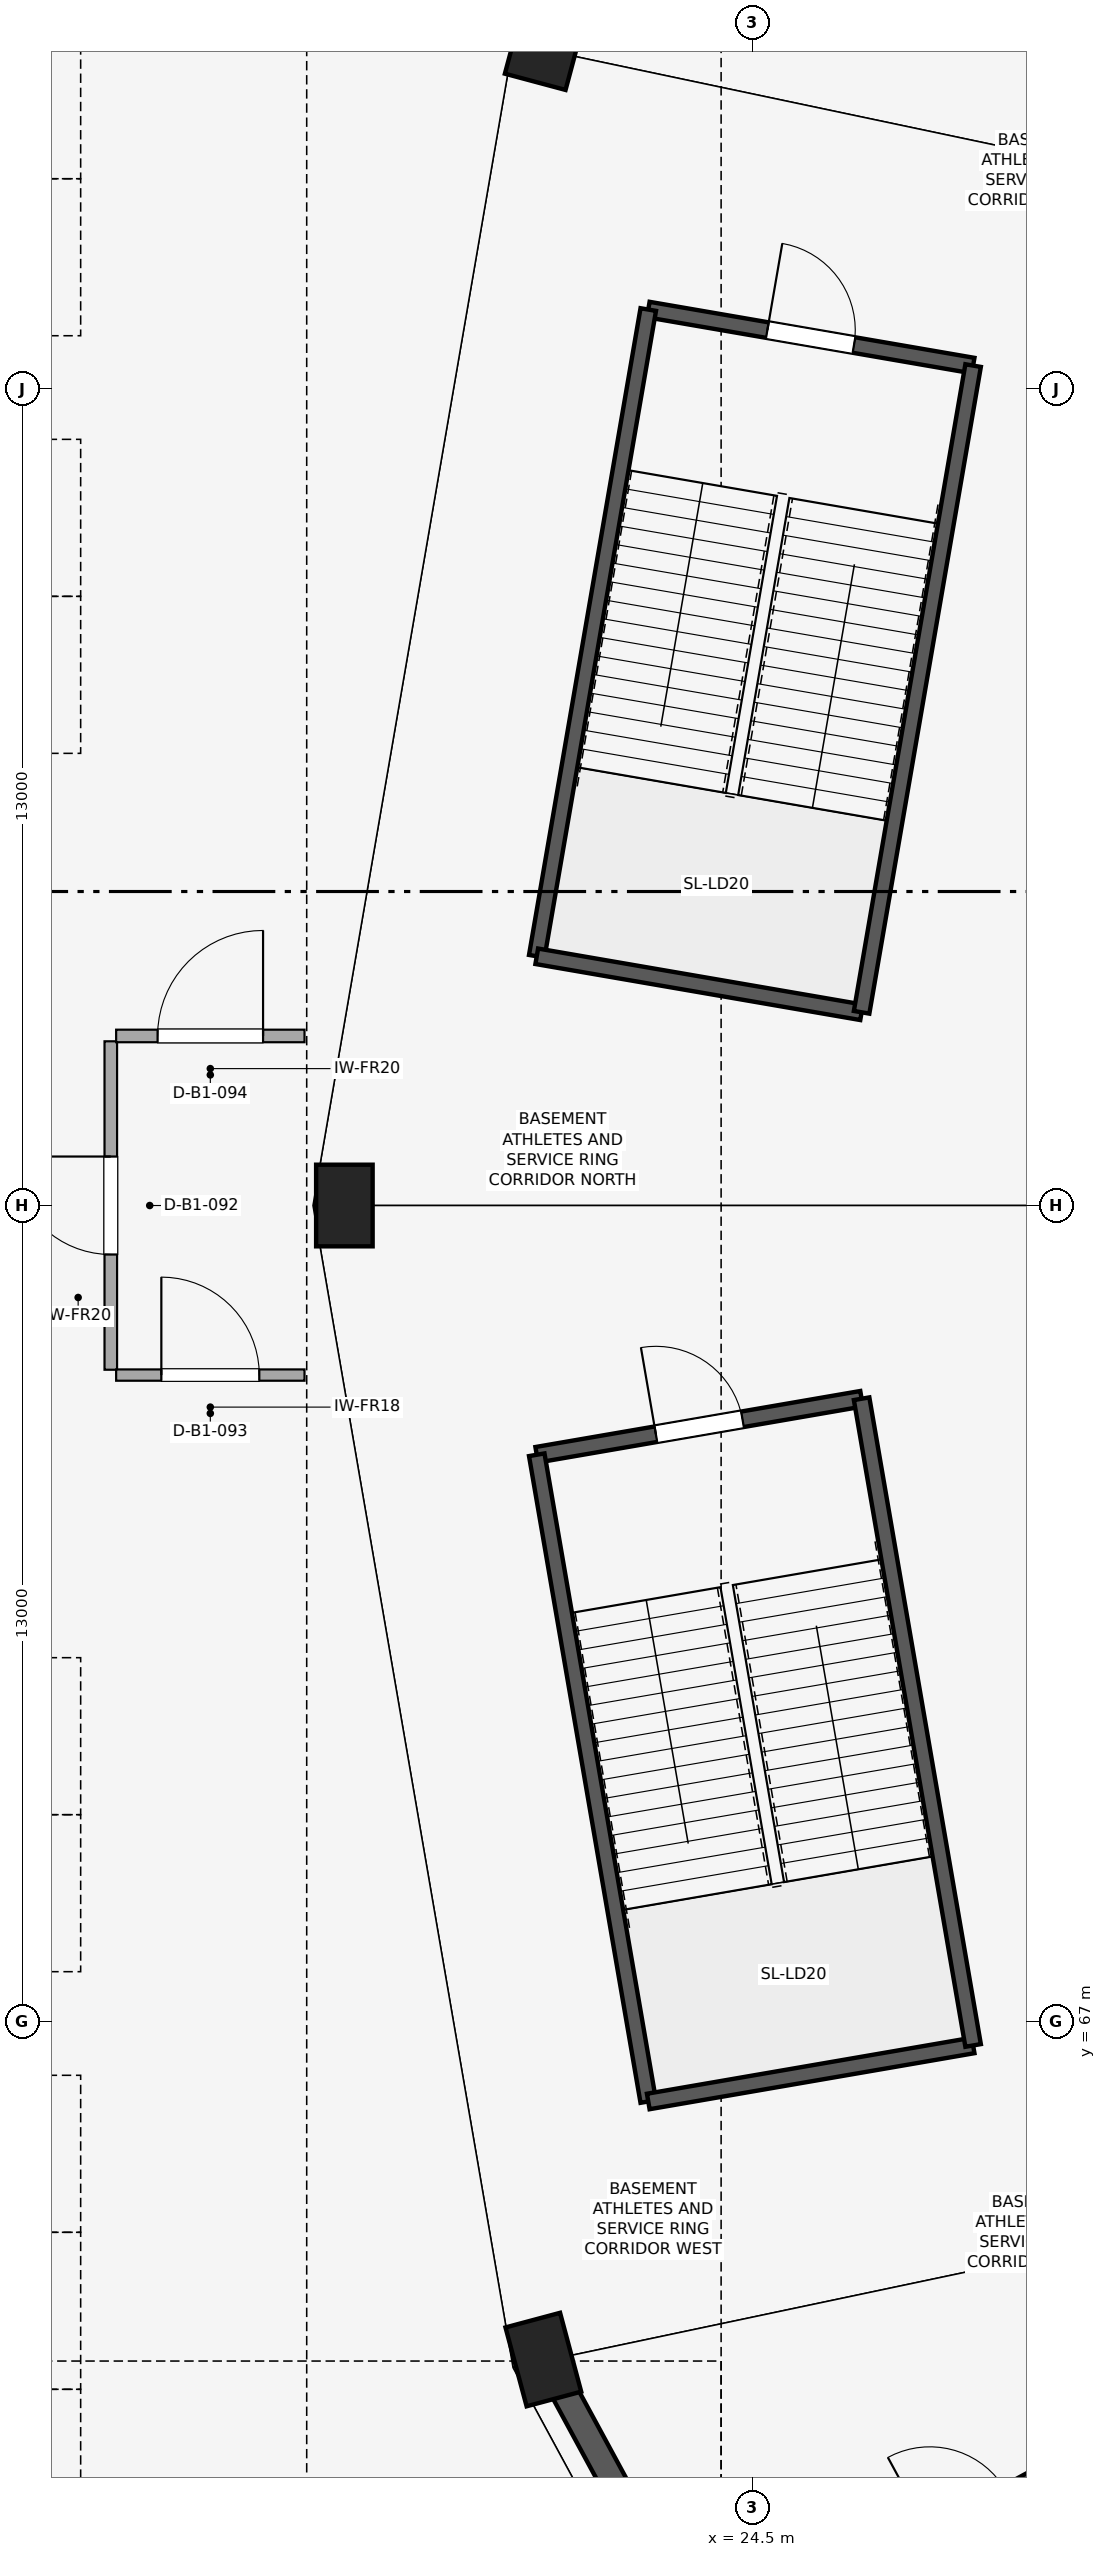
"""IFC4 building model, lengths in metres.
Left out: names, types, materials, properties, quantities, classifications, styles, units other than length and angle.
Written with IfcOpenShell. Run it as: python <this file> out.ifc"""

import sys

from ifc_helpers import new_model, si_unit, direction, frame, frame_2d, origin, origin_2d, place, context, subcontext, project, spatial, rectangle, extrude, element, fill, save


model = new_model("IFC4")
c1 = context("Model", 3, precision=1e-05, world=origin(), true_north=direction((0.0, 1.0)))
c2 = subcontext(c1, "Body", "Model", "MODEL_VIEW")
j1 = project(units=[si_unit("LENGTHUNIT", "METRE"), si_unit("PLANEANGLEUNIT", "RADIAN")], contexts=[c1])
p1 = place(None, origin())
s1 = spatial("IfcSite", under=j1, at=p1, CompositionType="ELEMENT")
p2 = place(p1, origin())
s2 = spatial("IfcBuilding", under=s1, at=p2, CompositionType="ELEMENT")
p3 = place(p2, frame((0.0, 0.0, -5.4)))
s3 = spatial("IfcBuildingStorey", under=s2, at=p3, CompositionType="ELEMENT", Elevation=-5.4)
p4 = place(p3, frame((21.169, 98.376, 0.0), z_axis=(0.0, 0.0, 1.0), x_axis=(-0.965925826289, 0.258819045103, 0.0)))
e1 = element("IfcColumn", 1, at=p4, inside=s3, PredefinedType="COLUMN", context=c2, shape_type="SweptSolid", body=[
    extrude(rectangle(XDim=1.0, YDim=1.0, at=origin_2d()), origin(), (0.0, 0.0, 1.0), 5.4),
])
for number, where, z_axis, x_axis in (
    (2, (18.0, 80.0, 0.0), (0.0, 0.0, 1.0), (-1.0, 0.0, 0.0)),
    (3, (21.169, 61.624, 0.0), (0.0, 0.0, 1.0), (-0.966, -0.259, 0.0)),
):
    element("IfcColumn", number, at=place(p3, frame(where, z_axis=z_axis, x_axis=x_axis)), inside=s3, PredefinedType="COLUMN", context=c2, shape_type="SweptSolid", body=[
        extrude(rectangle(XDim=0.9, YDim=1.3, at=origin_2d()), origin(), (0.0, 0.0, 1.0), 5.4),
    ])
for number, where, z_axis, x_axis in (
    (4, (30.503, 115.475, 0.0), (0.0, 0.0, 1.0), (-0.477, -0.879, 0.0)),
    (5, (21.217, 61.637, 0.0), (0.0, 0.0, 1.0), (0.477, -0.879, 0.0)),
):
    element("IfcWall", number, at=place(p3, frame(where, z_axis=z_axis, x_axis=x_axis)), inside=s3, PredefinedType="SOLIDWALL", context=c2, shape_type="SweptSolid", body=[
        extrude(rectangle(XDim=19.469, YDim=0.42, at=frame_2d((9.734, 0.0))), origin(), (0.0, 0.0, 1.0), 4.45),
    ])
p5 = place(p3, frame((26.238, 76.923, 0.0), z_axis=(0.0, 0.0, 1.0), x_axis=(-0.985457162135, -0.16992404655, 0.0)))
e6 = element("IfcWall", 6, at=p5, inside=s3, PredefinedType="SHEAR", context=c2, shape_type="SweptSolid", body=[
    extrude(rectangle(XDim=5.25, YDim=0.25, at=frame_2d((2.625, 0.0))), origin(), (0.0, 0.0, 1.0), 5.05),
])
p6 = place(p5, frame((1.925, 0.0, 0.0)))
e7 = element("IfcOpeningElement", 7, at=p6, cuts=e6, PredefinedType="OPENING", context=c2, shape_type="SweptSolid", body=[
    extrude(rectangle(XDim=1.4, YDim=2.2, at=frame_2d((0.7, 1.1))), frame((0.0, 0.135, 0.0), z_axis=(0.0, -1.0, 0.0), x_axis=(1.0, 0.0, 0.0)), (0.0, 0.0, 1.0), 0.27),
])
p7 = place(p3, frame((21.064, 76.031, 0.0), z_axis=(0.0, 0.0, 1.0), x_axis=(0.169938992676, -0.985454584833, 0.0)))
e8 = element("IfcWall", 8, at=p7, inside=s3, PredefinedType="SHEAR", context=c2, shape_type="SweptSolid", body=[
    extrude(rectangle(XDim=10.45, YDim=0.25, at=frame_2d((5.225, 0.0))), origin(), (0.0, 0.0, 1.0), 5.05),
])
p8 = place(p3, frame((22.84, 65.733, 0.0), z_axis=(0.0, 0.0, 1.0), x_axis=(0.985457162135, 0.16992404655, 0.0)))
e9 = element("IfcWall", 9, at=p8, inside=s3, PredefinedType="SHEAR", context=c2, shape_type="SweptSolid", body=[
    extrude(rectangle(XDim=5.25, YDim=0.25, at=frame_2d((2.625, 0.0))), origin(), (0.0, 0.0, 1.0), 5.05),
])
p9 = place(p3, frame((28.013, 66.625, 0.0), z_axis=(0.0, 0.0, 1.0), x_axis=(-0.169938992676, 0.985454584833, 0.0)))
e10 = element("IfcWall", 10, at=p9, inside=s3, PredefinedType="SHEAR", context=c2, shape_type="SweptSolid", body=[
    extrude(rectangle(XDim=10.45, YDim=0.25, at=frame_2d((5.225, 0.0))), origin(), (0.0, 0.0, 1.0), 5.05),
])
p10 = place(p3, frame((30.246, 60.42, 0.0), z_axis=(0.0, 0.0, 1.0), x_axis=(-0.878961487093, -0.47689275965, 0.0)))
e11 = element("IfcWall", 11, at=p10, inside=s3, PredefinedType="SHEAR", context=c2, shape_type="SweptSolid", body=[
    extrude(rectangle(XDim=5.25, YDim=0.25, at=frame_2d((2.625, 0.0))), origin(), (0.0, 0.0, 1.0), 5.05),
])
p11 = place(p10, frame((1.925, 0.0, 0.0)))
e12 = element("IfcOpeningElement", 12, at=p11, cuts=e11, PredefinedType="OPENING", context=c2, shape_type="SweptSolid", body=[
    extrude(rectangle(XDim=1.4, YDim=2.2, at=frame_2d((0.7, 1.1))), frame((0.0, 0.135, 0.0), z_axis=(0.0, -1.0, 0.0), x_axis=(1.0, 0.0, 0.0)), (0.0, 0.0, 1.0), 0.27),
])
p12 = place(p3, frame((28.013, 93.375, 0.0), z_axis=(0.0, 0.0, 1.0), x_axis=(-0.985457162135, 0.16992404655, 0.0)))
e13 = element("IfcWall", 13, at=p12, inside=s3, PredefinedType="SHEAR", context=c2, shape_type="SweptSolid", body=[
    extrude(rectangle(XDim=5.25, YDim=0.25, at=frame_2d((2.625, 0.0))), origin(), (0.0, 0.0, 1.0), 5.05),
])
p13 = place(p12, frame((1.925, 0.0, 0.0)))
e14 = element("IfcOpeningElement", 14, at=p13, cuts=e13, PredefinedType="OPENING", context=c2, shape_type="SweptSolid", body=[
    extrude(rectangle(XDim=1.4, YDim=2.2, at=frame_2d((0.7, 1.1))), frame((0.0, 0.135, 0.0), z_axis=(0.0, -1.0, 0.0), x_axis=(1.0, 0.0, 0.0)), (0.0, 0.0, 1.0), 0.27),
])
p14 = place(p3, frame((22.84, 94.267, 0.0), z_axis=(0.0, 0.0, 1.0), x_axis=(-0.169938992676, -0.985454584833, 0.0)))
e15 = element("IfcWall", 15, at=p14, inside=s3, PredefinedType="SHEAR", context=c2, shape_type="SweptSolid", body=[
    extrude(rectangle(XDim=10.45, YDim=0.25, at=frame_2d((5.225, 0.0))), origin(), (0.0, 0.0, 1.0), 5.05),
])
p15 = place(p3, frame((21.064, 83.969, 0.0), z_axis=(0.0, 0.0, 1.0), x_axis=(0.985458504796, -0.169916259745, 0.0)))
e16 = element("IfcWall", 16, at=p15, inside=s3, PredefinedType="SHEAR", context=c2, shape_type="SweptSolid", body=[
    extrude(rectangle(XDim=5.25, YDim=0.25, at=frame_2d((2.625, 0.0))), origin(), (0.0, 0.0, 1.0), 5.05),
])
p16 = place(p3, frame((26.238, 83.077, 0.0), z_axis=(0.0, 0.0, 1.0), x_axis=(0.16991630471, 0.985458497043, 0.0)))
e17 = element("IfcWall", 17, at=p16, inside=s3, PredefinedType="SHEAR", context=c2, shape_type="SweptSolid", body=[
    extrude(rectangle(XDim=10.45, YDim=0.25, at=frame_2d((5.225, 0.0))), origin(), (0.0, 0.0, 1.0), 5.05),
])
p17 = place(p3, frame((14.28, 77.385, 0.0), z_axis=(0.0, 0.0, 1.0), x_axis=(0.0, 1.0, 0.0)))
e18 = element("IfcWall", 18, at=p17, inside=s3, PredefinedType="PARTITIONING", context=c2, shape_type="SweptSolid", body=[
    extrude(rectangle(XDim=5.23, YDim=0.2, at=frame_2d((2.615, 0.0))), origin(), (0.0, 0.0, 1.0), 3.8),
])
p18 = place(p17, frame((1.835, 0.0, 0.0)))
e19 = element("IfcOpeningElement", 19, at=p18, cuts=e18, PredefinedType="OPENING", context=c2, shape_type="SweptSolid", body=[
    extrude(rectangle(XDim=1.56, YDim=2.24, at=frame_2d((0.78, 1.12))), frame((0.0, 0.11, 0.0), z_axis=(0.0, -1.0, 0.0), x_axis=(1.0, 0.0, 0.0)), (0.0, 0.0, 1.0), 0.22),
])
p19 = place(p3, frame((14.365, 77.3, 0.0), z_axis=(0.0, 0.0, 1.0), x_axis=(1.0, 0.0, 0.0)))
e20 = element("IfcWall", 20, at=p19, inside=s3, PredefinedType="PARTITIONING", context=c2, shape_type="SweptSolid", body=[
    extrude(rectangle(XDim=3.0, YDim=0.18, at=frame_2d((1.5, 0.0))), origin(), (0.0, 0.0, 1.0), 3.8),
])
p20 = place(p19, frame((0.72, 0.0, 0.0)))
e21 = element("IfcOpeningElement", 21, at=p20, cuts=e20, PredefinedType="OPENING", context=c2, shape_type="SweptSolid", body=[
    extrude(rectangle(XDim=1.56, YDim=2.38, at=frame_2d((0.78, 1.19))), frame((0.0, 0.1, 0.0), z_axis=(0.0, -1.0, 0.0), x_axis=(1.0, 0.0, 0.0)), (0.0, 0.0, 1.0), 0.2),
])
p21 = place(p3, frame((14.365, 82.7, 0.0), z_axis=(0.0, 0.0, 1.0), x_axis=(1.0, 0.0, 0.0)))
e22 = element("IfcWall", 22, at=p21, inside=s3, PredefinedType="PARTITIONING", context=c2, shape_type="SweptSolid", body=[
    extrude(rectangle(XDim=3.0, YDim=0.2, at=frame_2d((1.5, 0.0))), origin(), (0.0, 0.0, 1.0), 3.8),
])
p22 = place(p21, frame((0.66, 0.0, 0.0)))
e23 = element("IfcOpeningElement", 23, at=p22, cuts=e22, PredefinedType="OPENING", context=c2, shape_type="SweptSolid", body=[
    extrude(rectangle(XDim=1.68, YDim=2.1, at=frame_2d((0.84, 1.05))), frame((0.0, 0.11, 0.0), z_axis=(0.0, -1.0, 0.0), x_axis=(1.0, 0.0, 0.0)), (0.0, 0.0, 1.0), 0.22),
])
p23 = place(p6, frame((1.4, 0.0, 0.0), z_axis=(0.0, 0.0, 1.0), x_axis=(-1.0, 0.0, 0.0)))
e24 = element("IfcDoor", 24, at=p23, inside=s3, OperationType="SINGLE_SWING_LEFT", PredefinedType="DOOR", context=c2, shape_type="SweptSolid", body=[
    extrude(rectangle(XDim=1.4, YDim=2.2, at=frame_2d((0.7, 1.1))), frame((0.0, 0.025, 0.0), z_axis=(0.0, -1.0, 0.0), x_axis=(1.0, 0.0, 0.0)), (0.0, 0.0, 1.0), 0.05),
])
fill(e7, e24)
p24 = place(p13, frame((1.4, 0.0, 0.0), z_axis=(0.0, 0.0, 1.0), x_axis=(-1.0, 0.0, 0.0)))
e25 = element("IfcDoor", 25, at=p24, inside=s3, OperationType="SINGLE_SWING_LEFT", PredefinedType="DOOR", context=c2, shape_type="SweptSolid", body=[
    extrude(rectangle(XDim=1.4, YDim=2.2, at=frame_2d((0.7, 1.1))), frame((0.0, 0.025, 0.0), z_axis=(0.0, -1.0, 0.0), x_axis=(1.0, 0.0, 0.0)), (0.0, 0.0, 1.0), 0.05),
])
fill(e14, e25)
p25 = place(p18, origin())
e26 = element("IfcDoor", 26, at=p25, inside=s3, OperationType="SINGLE_SWING_RIGHT", PredefinedType="DOOR", context=c2, shape_type="SweptSolid", body=[
    extrude(rectangle(XDim=1.56, YDim=2.24, at=frame_2d((0.78, 1.12))), frame((0.0, 0.025, 0.0), z_axis=(0.0, -1.0, 0.0), x_axis=(1.0, 0.0, 0.0)), (0.0, 0.0, 1.0), 0.05),
])
fill(e19, e26)
p26 = place(p20, origin())
e27 = element("IfcDoor", 27, at=p26, inside=s3, OperationType="SINGLE_SWING_LEFT", PredefinedType="DOOR", context=c2, shape_type="SweptSolid", body=[
    extrude(rectangle(XDim=1.56, YDim=2.38, at=frame_2d((0.78, 1.19))), frame((0.0, 0.025, 0.0), z_axis=(0.0, -1.0, 0.0), x_axis=(1.0, 0.0, 0.0)), (0.0, 0.0, 1.0), 0.05),
])
fill(e21, e27)
p27 = place(p22, origin())
e28 = element("IfcDoor", 28, at=p27, inside=s3, OperationType="SINGLE_SWING_RIGHT", PredefinedType="DOOR", context=c2, shape_type="SweptSolid", body=[
    extrude(rectangle(XDim=1.68, YDim=2.1, at=frame_2d((0.84, 1.05))), frame((0.0, 0.025, 0.0), z_axis=(0.0, -1.0, 0.0), x_axis=(1.0, 0.0, 0.0)), (0.0, 0.0, 1.0), 0.05),
])
fill(e23, e28)
save(model, sys.argv[1])
